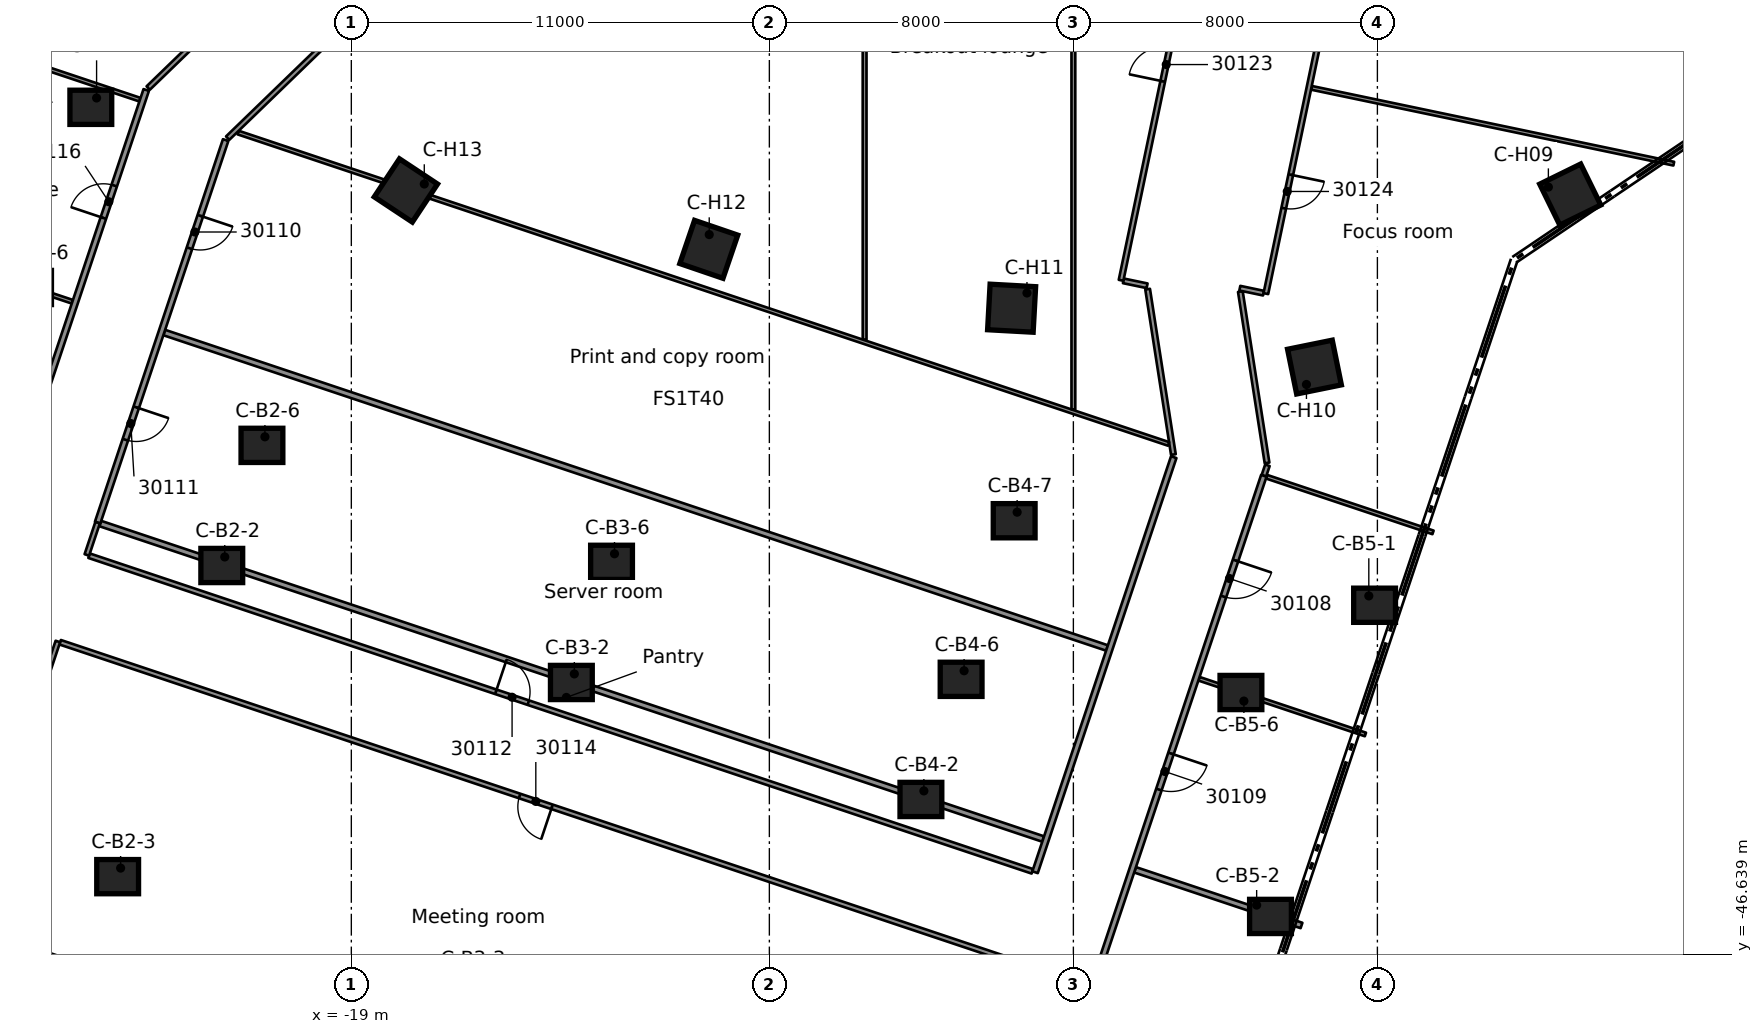
"""IFC4 building model, lengths in metres.
Left out: names, types, materials, properties, quantities, classifications, styles, units other than length and angle.
Written with IfcOpenShell. Run it as: python <this file> out.ifc"""

import sys

from ifc_helpers import new_model, si_unit, direction, frame, frame_2d, origin, origin_2d, place, context, subcontext, project, spatial, rectangle, extrude, element, fill, save


model = new_model("IFC4")
c1 = context("Model", 3, precision=1e-05, world=origin(), true_north=direction((0.0, 1.0)))
c2 = subcontext(c1, "Body", "Model", "MODEL_VIEW")
j1 = project(units=[si_unit("LENGTHUNIT", "METRE"), si_unit("PLANEANGLEUNIT", "RADIAN")], contexts=[c1])
p1 = place(None, origin())
s1 = spatial("IfcSite", under=j1, at=p1, CompositionType="ELEMENT")
p2 = place(p1, origin())
s2 = spatial("IfcBuilding", under=s1, at=p2, CompositionType="ELEMENT")
p3 = place(p2, frame((0.0, 0.0, 152.6)))
s3 = spatial("IfcBuildingStorey", under=s2, at=p3, CompositionType="ELEMENT", Elevation=152.6)
for number, where, z_axis, x_axis in (
    (1, (-25.855, -24.348, 0.0), (0.0, 0.0, 1.0), (1.0, 0.0, 0.0)),
    (2, (-22.409, -36.404, 0.0), (0.0, 0.0, 1.0), (1.0, 0.0, 0.0)),
    (3, (-25.149, -44.591, 0.0), (0.0, 0.0, 1.0), (1.0, 0.0, 0.0)),
    (4, (-21.352, -33.243, 0.0), (0.0, 0.0, 1.0), (1.0, 0.0, 0.0)),
    (5, (-13.21, -39.482, 0.0), (0.0, 0.0, 1.0), (1.0, 0.0, 0.0)),
    (6, (-12.153, -36.321, 0.0), (0.0, 0.0, 1.0), (1.0, 0.0, 0.0)),
    (7, (-4.012, -42.56, 0.0), (0.0, 0.0, 1.0), (1.0, 0.0, 0.0)),
    (8, (-2.954, -39.399, 0.0), (0.0, 0.0, 1.0), (1.0, 0.0, 0.0)),
    (9, (-1.558, -35.226, 0.0), (0.0, 0.0, 1.0), (1.0, 0.0, 0.0)),
    (10, (7.926, -37.45, 0.0), (0.0, 0.0, 1.0), (1.0, 0.0, 0.0)),
    (11, (5.187, -45.638, 0.0), (0.0, 0.0, 1.0), (1.0, 0.0, 0.0)),
    (12, (4.409, -39.746, 0.0), (0.0, 0.0, 1.0), (1.0, 0.0, 0.0)),
):
    element("IfcColumn", number, at=place(p3, frame(where, z_axis=z_axis, x_axis=x_axis)), inside=s3, PredefinedType="COLUMN", context=c2, shape_type="SweptSolid", body=[
        extrude(rectangle(XDim=1.1, YDim=0.9, at=origin_2d()), origin(), (0.0, 0.0, 1.0), 3.5),
    ])
for number, where, z_axis, x_axis in (
    (13, (13.075, -26.644, 0.0), (0.0, 0.0, 1.0), (0.441, -0.898, 0.0)),
    (14, (6.344, -31.183, 0.0), (0.0, 0.0, 1.0), (0.199, -0.98, 0.0)),
    (15, (-1.625, -29.634, 0.0), (0.0, 0.0, 1.0), (-0.055, -0.998, 0.0)),
    (16, (-9.594, -28.085, 0.0), (0.0, 0.0, 1.0), (-0.323, -0.946, 0.0)),
    (17, (-17.564, -26.536, 0.0), (0.0, 0.0, 1.0), (-0.552, -0.834, 0.0)),
):
    element("IfcColumn", number, at=place(p3, frame(where, z_axis=z_axis, x_axis=x_axis)), inside=s3, PredefinedType="COLUMN", context=c2, shape_type="SweptSolid", body=[
        extrude(rectangle(XDim=1.2, YDim=1.2, at=origin_2d()), origin(), (0.0, 0.0, 1.0), 3.5),
    ])
p4 = place(p3, frame((-5.494, -15.062, 0.0), z_axis=(0.0, 0.0, 1.0), x_axis=(6.3425617e-05, -0.999999997989, 0.0)))
e18 = element("IfcWall", 18, at=p4, inside=s3, PredefinedType="PARTITIONING", context=c2, shape_type="SweptSolid", body=[
    extrude(rectangle(XDim=15.397, YDim=0.1, at=frame_2d((7.698, 0.0))), origin(), (0.0, 0.0, 1.0), 3.08),
])
p5 = place(p3, frame((2.632, -33.485, 0.0), z_axis=(0.0, 0.0, 1.0), x_axis=(-0.153927089286, 0.988082208717, 0.0)))
e19 = element("IfcWall", 19, at=p5, inside=s3, PredefinedType="PARTITIONING", context=c2, shape_type="SweptSolid", body=[
    extrude(rectangle(XDim=4.405, YDim=0.125, at=frame_2d((2.202, 0.0))), origin(), (0.0, 0.0, 1.0), 3.08),
])
p6 = place(p3, frame((4.394, -29.196, 0.0), z_axis=(0.0, 0.0, 1.0), x_axis=(0.153813799922, -0.9880998507, 0.0)))
e20 = element("IfcWall", 20, at=p6, inside=s3, PredefinedType="PARTITIONING", context=c2, shape_type="SweptSolid", body=[
    extrude(rectangle(XDim=4.563, YDim=0.125, at=frame_2d((2.282, 0.0))), origin(), (0.0, 0.0, 1.0), 3.08),
])
p7 = place(p3, frame((-29.171, -45.917, 0.0), z_axis=(0.0, 0.0, 1.0), x_axis=(0.948337781815, -0.317262433299, 0.0)))
e21 = element("IfcWall", 21, at=p7, inside=s3, PredefinedType="PARTITIONING", context=c2, shape_type="SweptSolid", body=[
    extrude(rectangle(XDim=26.187, YDim=0.125, at=frame_2d((13.093, 0.0))), origin(), (0.0, 0.0, 1.0), 3.08),
])
p8 = place(p7, frame((12.538, 0.0, 0.0)))
e22 = element("IfcOpeningElement", 22, at=p8, cuts=e21, PredefinedType="OPENING", context=c2, shape_type="SweptSolid", body=[
    extrude(rectangle(XDim=0.9, YDim=2.1, at=frame_2d((0.45, 1.05))), frame((0.0, 0.073, 0.0), z_axis=(0.0, -1.0, 0.0), x_axis=(1.0, 0.0, 0.0)), (0.0, 0.0, 1.0), 0.145),
])
p9 = place(p3, frame((-1.829, -46.732, 0.0), z_axis=(0.0, 0.0, 1.0), x_axis=(-0.948329366448, 0.317287586791, 0.0)))
e23 = element("IfcWall", 23, at=p9, inside=s3, PredefinedType="PARTITIONING", context=c2, shape_type="SweptSolid", body=[
    extrude(rectangle(XDim=26.187, YDim=0.125, at=frame_2d((13.094, 0.0))), origin(), (0.0, 0.0, 1.0), 3.08),
])
p10 = place(p9, frame((12.538, 0.0, 0.0)))
e24 = element("IfcOpeningElement", 24, at=p10, cuts=e23, PredefinedType="OPENING", context=c2, shape_type="SweptSolid", body=[
    extrude(rectangle(XDim=0.9, YDim=2.1, at=frame_2d((0.45, 1.05))), frame((0.0, 0.073, 0.0), z_axis=(0.0, -1.0, 0.0), x_axis=(1.0, 0.0, 0.0)), (0.0, 0.0, 1.0), 0.145),
])
p11 = place(p3, frame((-25.901, -36.146, 0.0), z_axis=(0.0, 0.0, 1.0), x_axis=(0.948327321089, -0.317293700025, 0.0)))
e25 = element("IfcWall", 25, at=p11, inside=s3, PredefinedType="PARTITIONING", context=c2, shape_type="SweptSolid", body=[
    extrude(rectangle(XDim=26.174, YDim=0.125, at=frame_2d((13.087, 0.0))), origin(), (0.0, 0.0, 1.0), 3.08),
])
p12 = place(p11, frame((11.288, 0.0, 0.0)))
e26 = element("IfcOpeningElement", 26, at=p12, cuts=e25, PredefinedType="OPENING", context=c2, shape_type="SweptSolid", body=[
    extrude(rectangle(XDim=0.9, YDim=2.1, at=frame_2d((0.45, 1.05))), frame((0.0, 0.073, 0.0), z_axis=(0.0, -1.0, 0.0), x_axis=(1.0, 0.0, 0.0)), (0.0, 0.0, 1.0), 0.145),
])
p13 = place(p3, frame((-25.605, -35.3, 0.0), z_axis=(0.0, 0.0, 1.0), x_axis=(0.948327152728, -0.317294203223, 0.0)))
e27 = element("IfcWall", 27, at=p13, inside=s3, PredefinedType="PARTITIONING", context=c2, shape_type="SweptSolid", body=[
    extrude(rectangle(XDim=26.162, YDim=0.15, at=frame_2d((13.081, 0.0))), origin(), (0.0, 0.0, 1.0), 3.08),
])
p14 = place(p3, frame((1.624, -44.411, 0.0), z_axis=(0.0, 0.0, 1.0), x_axis=(0.948328454315, -0.317290313021, 0.0)))
e28 = element("IfcWall", 28, at=p14, inside=s3, PredefinedType="PARTITIONING", context=c2, shape_type="SweptSolid", body=[
    extrude(rectangle(XDim=4.617, YDim=0.15, at=frame_2d((2.309, 0.0))), origin(), (0.0, 0.0, 1.0), 3.08),
])
p15 = place(p3, frame((-30.722, -27.999, 0.0), z_axis=(0.0, 0.0, 1.0), x_axis=(0.948349739438, -0.317226688203, 0.0)))
e29 = element("IfcWall", 29, at=p15, inside=s3, PredefinedType="PARTITIONING", context=c2, shape_type="SweptSolid", body=[
    extrude(rectangle(XDim=4.618, YDim=0.1, at=frame_2d((2.309, 0.0))), origin(), (0.0, 0.0, 1.0), 3.08),
])
p16 = place(p3, frame((-23.923, -30.274, 0.0), z_axis=(0.0, 0.0, 1.0), x_axis=(0.948327152728, -0.317294203223, 0.0)))
e30 = element("IfcWall", 30, at=p16, inside=s3, PredefinedType="PARTITIONING", context=c2, shape_type="SweptSolid", body=[
    extrude(rectangle(XDim=26.162, YDim=0.15, at=frame_2d((13.081, 0.0))), origin(), (0.0, 0.0, 1.0), 3.08),
])
p17 = place(p3, frame((3.306, -39.384, 0.0), z_axis=(0.0, 0.0, 1.0), x_axis=(0.948270131157, -0.317464578112, 0.0)))
e31 = element("IfcWall", 31, at=p17, inside=s3, PredefinedType="PARTITIONING", context=c2, shape_type="SweptSolid", body=[
    extrude(rectangle(XDim=4.618, YDim=0.1, at=frame_2d((2.309, 0.0))), origin(), (0.0, 0.0, 1.0), 3.08),
])
p18 = place(p3, frame((-28.943, -22.682, 0.0), z_axis=(0.0, 0.0, 1.0), x_axis=(0.948355058718, -0.317210785763, 0.0)))
e32 = element("IfcWall", 32, at=p18, inside=s3, PredefinedType="PARTITIONING", context=c2, shape_type="SweptSolid", body=[
    extrude(rectangle(XDim=4.619, YDim=0.1, at=frame_2d((2.309, 0.0))), origin(), (0.0, 0.0, 1.0), 3.08),
])
p19 = place(p3, frame((-21.98, -25.012, 0.0), z_axis=(0.0, 0.0, 1.0), x_axis=(0.948316725504, -0.31732536635, 0.0)))
e33 = element("IfcWall", 33, at=p19, inside=s3, PredefinedType="PARTITIONING", context=c2, shape_type="SweptSolid", body=[
    extrude(rectangle(XDim=25.819, YDim=0.1, at=frame_2d((12.91, 0.0))), origin(), (0.0, 0.0, 1.0), 3.08),
])
p20 = place(p3, frame((5.084, -34.068, 0.0), z_axis=(0.0, 0.0, 1.0), x_axis=(0.948370959481, -0.317163243793, 0.0)))
e34 = element("IfcWall", 34, at=p20, inside=s3, PredefinedType="PARTITIONING", context=c2, shape_type="SweptSolid", body=[
    extrude(rectangle(XDim=4.619, YDim=0.1, at=frame_2d((2.309, 0.0))), origin(), (0.0, 0.0, 1.0), 3.08),
])
p21 = place(p3, frame((4.38, -29.107, 0.0), z_axis=(0.0, 0.0, 1.0), x_axis=(0.978635010671, -0.205605242852, 0.0)))
e35 = element("IfcWall", 35, at=p21, inside=s3, PredefinedType="PARTITIONING", context=c2, shape_type="SweptSolid", body=[
    extrude(rectangle(XDim=0.638, YDim=0.125, at=frame_2d((0.319, 0.0))), origin(), (0.0, 0.0, 1.0), 3.08),
])
p22 = place(p3, frame((1.316, -28.914, 0.0), z_axis=(0.0, 0.0, 1.0), x_axis=(0.979018641563, -0.203770703174, 0.0)))
e36 = element("IfcWall", 36, at=p22, inside=s3, PredefinedType="PARTITIONING", context=c2, shape_type="SweptSolid", body=[
    extrude(rectangle(XDim=0.637, YDim=0.125, at=frame_2d((0.319, 0.0))), origin(), (0.0, 0.0, 1.0), 3.08),
])
p23 = place(p3, frame((6.263, -23.835, 0.0), z_axis=(0.0, 0.0, 1.0), x_axis=(0.978787353233, -0.204878786483, 0.0)))
e37 = element("IfcWall", 37, at=p23, inside=s3, PredefinedType="PARTITIONING", context=c2, shape_type="SweptSolid", body=[
    extrude(rectangle(XDim=9.743, YDim=0.1, at=frame_2d((4.872, 0.0))), origin(), (0.0, 0.0, 1.0), 3.08),
])
p24 = place(p3, frame((-17.529, -20.587, 0.0), z_axis=(0.0, 0.0, 1.0), x_axis=(-0.71863386664, -0.69538864365, 0.0)))
e38 = element("IfcWall", 38, at=p24, inside=s3, PredefinedType="PARTITIONING", context=c2, shape_type="SweptSolid", body=[
    extrude(rectangle(XDim=6.575, YDim=0.125, at=frame_2d((3.287, 0.0))), origin(), (0.0, 0.0, 1.0), 3.08),
])
p25 = place(p3, frame((-24.345, -23.841, 0.0), z_axis=(0.0, 0.0, 1.0), x_axis=(0.718684819468, 0.695335983727, 0.0)))
e39 = element("IfcWall", 39, at=p25, inside=s3, PredefinedType="PARTITIONING", context=c2, shape_type="SweptSolid", body=[
    extrude(rectangle(XDim=6.378, YDim=0.125, at=frame_2d((3.189, 0.0))), origin(), (0.0, 0.0, 1.0), 3.08),
])
p26 = place(p3, frame((5.013, -34.044, 0.0), z_axis=(0.0, 0.0, 1.0), x_axis=(0.318483843222, 0.947928289274, 0.0)))
e40 = element("IfcWall", 40, at=p26, inside=s3, PredefinedType="PARTITIONING", context=c2, shape_type="SweptSolid", body=[
    extrude(rectangle(XDim=0.292, YDim=0.125, at=frame_2d((0.146, 0.0))), origin(), (0.0, 0.0, 1.0), 3.08),
])
p27 = place(p3, frame((5.012, -34.044, 0.0), z_axis=(0.0, 0.0, 1.0), x_axis=(-0.317228830318, -0.948349022889, 0.0)))
e41 = element("IfcWall", 41, at=p27, inside=s3, PredefinedType="PARTITIONING", context=c2, shape_type="SweptSolid", body=[
    extrude(rectangle(XDim=24.506, YDim=0.15, at=frame_2d((12.253, 0.0))), origin(), (0.0, 0.0, 1.0), 3.08),
])
p28 = place(p27, frame((2.349, 0.0, 0.0)))
e42 = element("IfcOpeningElement", 42, at=p28, cuts=e41, PredefinedType="OPENING", context=c2, shape_type="SweptSolid", body=[
    extrude(rectangle(XDim=1.0, YDim=2.1, at=frame_2d((0.5, 1.05))), frame((0.0, 0.085, 0.0), z_axis=(0.0, -1.0, 0.0), x_axis=(1.0, 0.0, 0.0)), (0.0, 0.0, 1.0), 0.17),
])
p29 = place(p27, frame((7.705, 0.0, 0.0)))
e43 = element("IfcOpeningElement", 43, at=p29, cuts=e41, PredefinedType="OPENING", context=c2, shape_type="SweptSolid", body=[
    extrude(rectangle(XDim=1.0, YDim=2.1, at=frame_2d((0.5, 1.05))), frame((0.0, 0.085, 0.0), z_axis=(0.0, -1.0, 0.0), x_axis=(1.0, 0.0, 0.0)), (0.0, 0.0, 1.0), 0.17),
])
p30 = place(p3, frame((-1.008, -44.475, 0.0), z_axis=(0.0, 0.0, 1.0), x_axis=(0.316889155775, 0.948462578572, 0.0)))
e44 = element("IfcWall", 44, at=p30, inside=s3, PredefinedType="PARTITIONING", context=c2, shape_type="SweptSolid", body=[
    extrude(rectangle(XDim=11.516, YDim=0.15, at=frame_2d((5.758, 0.0))), origin(), (0.0, 0.0, 1.0), 3.08),
])
p31 = place(p3, frame((-29.23, -45.897, 0.0), z_axis=(0.0, 0.0, 1.0), x_axis=(0.317376800691, 0.948299513014, 0.0)))
e45 = element("IfcWall", 45, at=p31, inside=s3, PredefinedType="PARTITIONING", context=c2, shape_type="SweptSolid", body=[
    extrude(rectangle(XDim=7.902, YDim=0.125, at=frame_2d((3.951, 0.0))), origin(), (0.0, 0.0, 1.0), 3.08),
])
p32 = place(p3, frame((-22.307, -25.21, 0.0), z_axis=(0.0, 0.0, 1.0), x_axis=(-0.317400526235, -0.948291572221, 0.0)))
e46 = element("IfcWall", 46, at=p32, inside=s3, PredefinedType="PARTITIONING", context=c2, shape_type="SweptSolid", body=[
    extrude(rectangle(XDim=10.615, YDim=0.15, at=frame_2d((5.307, 0.0))), origin(), (0.0, 0.0, 1.0), 3.08),
])
p33 = place(p32, frame((2.101, 0.0, 0.0)))
e47 = element("IfcOpeningElement", 47, at=p33, cuts=e46, PredefinedType="OPENING", context=c2, shape_type="SweptSolid", body=[
    extrude(rectangle(XDim=0.9, YDim=2.1, at=frame_2d((0.45, 1.05))), frame((0.0, 0.085, 0.0), z_axis=(0.0, -1.0, 0.0), x_axis=(1.0, 0.0, 0.0)), (0.0, 0.0, 1.0), 0.17),
])
p34 = place(p32, frame((7.414, 0.0, 0.0)))
e48 = element("IfcOpeningElement", 48, at=p34, cuts=e46, PredefinedType="OPENING", context=c2, shape_type="SweptSolid", body=[
    extrude(rectangle(XDim=0.9, YDim=2.1, at=frame_2d((0.45, 1.05))), frame((0.0, 0.085, 0.0), z_axis=(0.0, -1.0, 0.0), x_axis=(1.0, 0.0, 0.0)), (0.0, 0.0, 1.0), 0.17),
])
p35 = place(p3, frame((-25.96, -36.126, 0.0), z_axis=(0.0, 0.0, 1.0), x_axis=(0.316799745903, 0.948492446462, 0.0)))
e49 = element("IfcWall", 49, at=p35, inside=s3, PredefinedType="PARTITIONING", context=c2, shape_type="SweptSolid", body=[
    extrude(rectangle(XDim=0.896, YDim=0.125, at=frame_2d((0.448, 0.0))), origin(), (0.0, 0.0, 1.0), 3.08),
])
p36 = place(p3, frame((-31.507, -45.135, 0.0), z_axis=(0.0, 0.0, 1.0), x_axis=(0.317398027953, 0.948292408412, 0.0)))
e50 = element("IfcWall", 50, at=p36, inside=s3, PredefinedType="PARTITIONING", context=c2, shape_type="SweptSolid", body=[
    extrude(rectangle(XDim=22.401, YDim=0.15, at=frame_2d((11.201, 0.0))), origin(), (0.0, 0.0, 1.0), 3.08),
])
p37 = place(p36, frame((18.85, 0.0, 0.0)))
e51 = element("IfcOpeningElement", 51, at=p37, cuts=e50, PredefinedType="OPENING", context=c2, shape_type="SweptSolid", body=[
    extrude(rectangle(XDim=0.9, YDim=2.1, at=frame_2d((0.45, 1.05))), frame((0.0, 0.085, 0.0), z_axis=(0.0, -1.0, 0.0), x_axis=(1.0, 0.0, 0.0)), (0.0, 0.0, 1.0), 0.17),
])
p38 = place(p36, frame((13.3, 0.0, 0.0)))
e52 = element("IfcOpeningElement", 52, at=p38, cuts=e50, PredefinedType="OPENING", context=c2, shape_type="SweptSolid", body=[
    extrude(rectangle(XDim=0.9, YDim=2.1, at=frame_2d((0.45, 1.05))), frame((0.0, 0.085, 0.0), z_axis=(0.0, -1.0, 0.0), x_axis=(1.0, 0.0, 0.0)), (0.0, 0.0, 1.0), 0.17),
])
p39 = place(p3, frame((8.049, -15.003, 0.0), z_axis=(0.0, 0.0, 1.0), x_axis=(-0.205007019442, -0.97876050287, 0.0)))
e53 = element("IfcWall", 53, at=p39, inside=s3, PredefinedType="PARTITIONING", context=c2, shape_type="SweptSolid", body=[
    extrude(rectangle(XDim=14.556, YDim=0.125, at=frame_2d((7.278, 0.0))), origin(), (0.0, 0.0, 1.0), 3.08),
])
p40 = place(p39, frame((11.36, 0.0, 0.0)))
e54 = element("IfcOpeningElement", 54, at=p40, cuts=e53, PredefinedType="OPENING", context=c2, shape_type="SweptSolid", body=[
    extrude(rectangle(XDim=0.9, YDim=2.1, at=frame_2d((0.45, 1.05))), frame((0.0, 0.073, 0.0), z_axis=(0.0, -1.0, 0.0), x_axis=(1.0, 0.0, 0.0)), (0.0, 0.0, 1.0), 0.145),
])
p41 = place(p3, frame((1.255, -28.9, 0.0), z_axis=(0.0, 0.0, 1.0), x_axis=(0.204949727958, 0.978772501151, 0.0)))
e55 = element("IfcWall", 55, at=p41, inside=s3, PredefinedType="PARTITIONING", context=c2, shape_type="SweptSolid", body=[
    extrude(rectangle(XDim=14.199, YDim=0.125, at=frame_2d((7.1, 0.0))), origin(), (0.0, 0.0, 1.0), 3.08),
])
p42 = place(p41, frame((5.35, 0.0, 0.0)))
e56 = element("IfcOpeningElement", 56, at=p42, cuts=e55, PredefinedType="OPENING", context=c2, shape_type="SweptSolid", body=[
    extrude(rectangle(XDim=0.9, YDim=2.1, at=frame_2d((0.45, 1.05))), frame((0.0, 0.073, 0.0), z_axis=(0.0, -1.0, 0.0), x_axis=(1.0, 0.0, 0.0)), (0.0, 0.0, 1.0), 0.145),
])
p43 = place(p3, frame((0.0, -32.297, 0.0), z_axis=(0.0, 0.0, 1.0), x_axis=(0.0, 1.0, 0.0)))
e57 = element("IfcWall", 57, at=p43, inside=s3, PredefinedType="PARTITIONING", context=c2, shape_type="SweptSolid", body=[
    extrude(rectangle(XDim=17.235, YDim=0.1, at=frame_2d((8.618, 0.0))), origin(), (0.0, 0.0, 1.0), 3.08),
])
p44 = place(p28, origin())
e58 = element("IfcDoor", 58, at=p44, inside=s3, OperationType="SINGLE_SWING_LEFT", PredefinedType="DOOR", context=c2, shape_type="SweptSolid", body=[
    extrude(rectangle(XDim=1.0, YDim=2.1, at=frame_2d((0.5, 1.05))), frame((0.0, 0.025, 0.0), z_axis=(0.0, -1.0, 0.0), x_axis=(1.0, 0.0, 0.0)), (0.0, 0.0, 1.0), 0.05),
])
fill(e42, e58)
p45 = place(p29, origin())
e59 = element("IfcDoor", 59, at=p45, inside=s3, OperationType="SINGLE_SWING_LEFT", PredefinedType="DOOR", context=c2, shape_type="SweptSolid", body=[
    extrude(rectangle(XDim=1.0, YDim=2.1, at=frame_2d((0.5, 1.05))), frame((0.0, 0.025, 0.0), z_axis=(0.0, -1.0, 0.0), x_axis=(1.0, 0.0, 0.0)), (0.0, 0.0, 1.0), 0.05),
])
fill(e43, e59)
p46 = place(p33, origin())
e60 = element("IfcDoor", 60, at=p46, inside=s3, OperationType="SINGLE_SWING_LEFT", PredefinedType="DOOR", context=c2, shape_type="SweptSolid", body=[
    extrude(rectangle(XDim=0.9, YDim=2.1, at=frame_2d((0.45, 1.05))), frame((0.0, 0.025, 0.0), z_axis=(0.0, -1.0, 0.0), x_axis=(1.0, 0.0, 0.0)), (0.0, 0.0, 1.0), 0.05),
])
fill(e47, e60)
p47 = place(p34, origin())
e61 = element("IfcDoor", 61, at=p47, inside=s3, OperationType="SINGLE_SWING_RIGHT", PredefinedType="DOOR", context=c2, shape_type="SweptSolid", body=[
    extrude(rectangle(XDim=0.9, YDim=2.1, at=frame_2d((0.45, 1.05))), frame((0.0, 0.025, 0.0), z_axis=(0.0, -1.0, 0.0), x_axis=(1.0, 0.0, 0.0)), (0.0, 0.0, 1.0), 0.05),
])
fill(e48, e61)
p48 = place(p12, origin())
e62 = element("IfcDoor", 62, at=p48, inside=s3, OperationType="SINGLE_SWING_LEFT", PredefinedType="DOOR", context=c2, shape_type="SweptSolid", body=[
    extrude(rectangle(XDim=0.9, YDim=2.1, at=frame_2d((0.45, 1.05))), frame((0.0, 0.025, 0.0), z_axis=(0.0, -1.0, 0.0), x_axis=(1.0, 0.0, 0.0)), (0.0, 0.0, 1.0), 0.05),
])
fill(e26, e62)
p49 = place(p10, origin())
e63 = element("IfcDoor", 63, at=p49, inside=s3, OperationType="SINGLE_SWING_LEFT", PredefinedType="DOOR", context=c2, shape_type="SweptSolid", body=[
    extrude(rectangle(XDim=0.9, YDim=2.1, at=frame_2d((0.45, 1.05))), frame((0.0, 0.025, 0.0), z_axis=(0.0, -1.0, 0.0), x_axis=(1.0, 0.0, 0.0)), (0.0, 0.0, 1.0), 0.05),
])
fill(e24, e63)
p50 = place(p37, origin())
e64 = element("IfcDoor", 64, at=p50, inside=s3, OperationType="SINGLE_SWING_RIGHT", PredefinedType="DOOR", context=c2, shape_type="SweptSolid", body=[
    extrude(rectangle(XDim=0.9, YDim=2.1, at=frame_2d((0.45, 1.05))), frame((0.0, 0.025, 0.0), z_axis=(0.0, -1.0, 0.0), x_axis=(1.0, 0.0, 0.0)), (0.0, 0.0, 1.0), 0.05),
])
fill(e51, e64)
p51 = place(p42, origin())
e65 = element("IfcDoor", 65, at=p51, inside=s3, OperationType="SINGLE_SWING_LEFT", PredefinedType="DOOR", context=c2, shape_type="SweptSolid", body=[
    extrude(rectangle(XDim=0.9, YDim=2.1, at=frame_2d((0.45, 1.05))), frame((0.0, 0.025, 0.0), z_axis=(0.0, -1.0, 0.0), x_axis=(1.0, 0.0, 0.0)), (0.0, 0.0, 1.0), 0.05),
])
fill(e56, e65)
p52 = place(p40, origin())
e66 = element("IfcDoor", 66, at=p52, inside=s3, OperationType="SINGLE_SWING_RIGHT", PredefinedType="DOOR", context=c2, shape_type="SweptSolid", body=[
    extrude(rectangle(XDim=0.9, YDim=2.1, at=frame_2d((0.45, 1.05))), frame((0.0, 0.025, 0.0), z_axis=(0.0, -1.0, 0.0), x_axis=(1.0, 0.0, 0.0)), (0.0, 0.0, 1.0), 0.05),
])
fill(e54, e66)
save(model, sys.argv[1])
